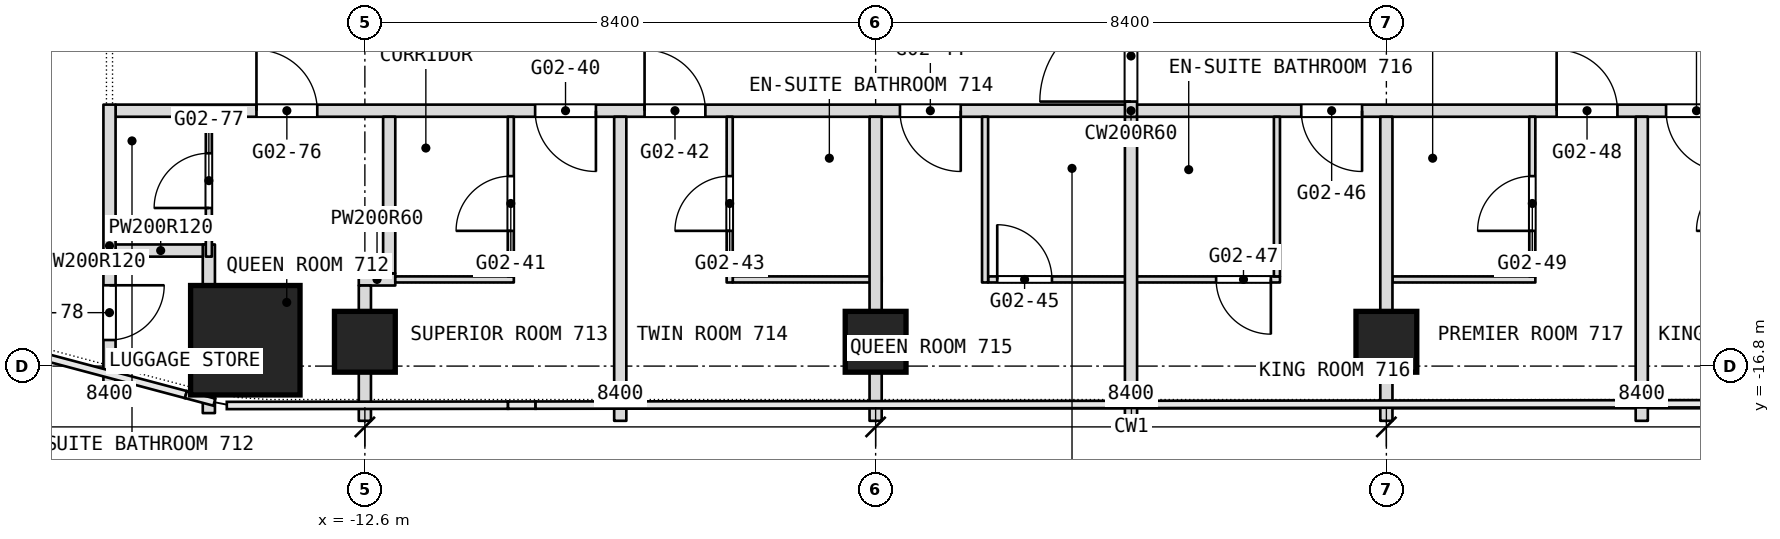
"""IFC4 building model, lengths in metres.
Left out: names, types, materials, properties, quantities, classifications, styles, units other than length and angle.
Written with IfcOpenShell. Run it as: python <this file> out.ifc"""

import sys

from ifc_helpers import new_model, si_unit, direction, frame, frame_2d, origin, origin_2d, place, context, subcontext, project, spatial, rectangle, extrude, element, fill, save


model = new_model("IFC4")
c1 = context("Model", 3, precision=1e-05, world=origin(), true_north=direction((0.0, 1.0)))
c2 = subcontext(c1, "Body", "Model", "MODEL_VIEW")
j1 = project(units=[si_unit("LENGTHUNIT", "METRE"), si_unit("PLANEANGLEUNIT", "RADIAN")], contexts=[c1])
p1 = place(None, origin())
s1 = spatial("IfcSite", under=j1, at=p1, CompositionType="ELEMENT")
p2 = place(p1, origin())
s2 = spatial("IfcBuilding", under=s1, at=p2, CompositionType="ELEMENT")
p3 = place(p2, frame((0.0, 0.0, 40.1)))
s3 = spatial("IfcBuildingStorey", under=s2, at=p3, CompositionType="ELEMENT", Elevation=40.1)
p4 = place(p3, frame((-14.566, -16.375, 0.0), z_axis=(0.0, 0.0, 1.0), x_axis=(1.0, 0.0, 0.0)))
e1 = element("IfcColumn", 1, at=p4, inside=s3, PredefinedType="COLUMN", context=c2, shape_type="SweptSolid", body=[
    extrude(rectangle(XDim=1.8, YDim=1.8, at=origin_2d()), origin(), (0.0, 0.0, 1.0), 3.6),
])
for number, where, z_axis, x_axis in (
    (2, (4.2, -16.4, 0.0), (0.0, 0.0, 1.0), (1.0, 0.0, 0.0)),
    (3, (-4.2, -16.4, 0.0), (0.0, 0.0, 1.0), (1.0, 0.0, 0.0)),
    (4, (-12.6, -16.4, 0.0), (0.0, 0.0, 1.0), (1.0, 0.0, 0.0)),
):
    element("IfcColumn", number, at=place(p3, frame(where, z_axis=z_axis, x_axis=x_axis)), inside=s3, PredefinedType="COLUMN", context=c2, shape_type="SweptSolid", body=[
        extrude(rectangle(XDim=1.0, YDim=1.0, at=origin_2d()), origin(), (0.0, 0.0, 1.0), 3.6),
    ])
p5 = place(p3, frame((-12.7, -15.375, 0.0), z_axis=(0.0, 0.0, 1.0), x_axis=(1.0, 0.0, 0.0)))
e5 = element("IfcWall", 5, at=p5, inside=s3, PredefinedType="PARTITIONING", context=c2, shape_type="SweptSolid", body=[
    extrude(rectangle(XDim=0.6, YDim=0.2, at=frame_2d((0.3, 0.0))), origin(), (0.0, 0.0, 1.0), 3.34),
])
p6 = place(p3, frame((-12.1, -15.375, 0.0), z_axis=(0.0, 0.0, 1.0), x_axis=(1.0, 0.0, 0.0)))
e6 = element("IfcWall", 6, at=p6, inside=s3, PredefinedType="PARTITIONING", context=c2, shape_type="SweptSolid", body=[
    extrude(rectangle(XDim=1.95, YDim=0.1, at=frame_2d((0.975, 0.0))), origin(), (0.0, 0.0, 1.0), 3.34),
])
p7 = place(p3, frame((-6.55, -15.375, 0.0), z_axis=(0.0, 0.0, 1.0), x_axis=(1.0, 0.0, 0.0)))
e7 = element("IfcWall", 7, at=p7, inside=s3, PredefinedType="PARTITIONING", context=c2, shape_type="SweptSolid", body=[
    extrude(rectangle(XDim=2.45, YDim=0.1, at=frame_2d((1.225, 0.0))), origin(), (0.0, 0.0, 1.0), 3.34),
])
p8 = place(p3, frame((-2.35, -15.375, 0.0), z_axis=(0.0, 0.0, 1.0), x_axis=(1.0, 0.0, 0.0)))
e8 = element("IfcWall", 8, at=p8, inside=s3, PredefinedType="PARTITIONING", context=c2, shape_type="SweptSolid", body=[
    extrude(rectangle(XDim=4.8, YDim=0.1, at=frame_2d((2.4, 0.0))), origin(), (0.0, 0.0, 1.0), 3.34),
])
p9 = place(p8, frame((0.15, 0.0, 0.0)))
e9 = element("IfcOpeningElement", 9, at=p9, cuts=e8, PredefinedType="OPENING", context=c2, shape_type="SweptSolid", body=[
    extrude(rectangle(XDim=0.9, YDim=2.1, at=frame_2d((0.45, 1.05))), frame((0.0, 0.05, 0.0), z_axis=(0.0, -1.0, 0.0), x_axis=(1.0, 0.0, 0.0)), (0.0, 0.0, 1.0), 0.1),
])
p10 = place(p8, frame((3.75, 0.0, 0.0)))
e10 = element("IfcOpeningElement", 10, at=p10, cuts=e8, PredefinedType="OPENING", context=c2, shape_type="SweptSolid", body=[
    extrude(rectangle(XDim=0.9, YDim=2.1, at=frame_2d((0.45, 1.05))), frame((0.0, 0.05, 0.0), z_axis=(0.0, -1.0, 0.0), x_axis=(1.0, 0.0, 0.0)), (0.0, 0.0, 1.0), 0.1),
])
p11 = place(p3, frame((4.3, -15.375, 0.0), z_axis=(0.0, 0.0, 1.0), x_axis=(1.0, 0.0, 0.0)))
e11 = element("IfcWall", 11, at=p11, inside=s3, PredefinedType="PARTITIONING", context=c2, shape_type="SweptSolid", body=[
    extrude(rectangle(XDim=2.35, YDim=0.1, at=frame_2d((1.175, 0.0))), origin(), (0.0, 0.0, 1.0), 3.34),
])
p12 = place(p3, frame((-16.7, -14.9, 0.0), z_axis=(0.0, 0.0, 1.0), x_axis=(1.0, 0.0, 0.0)))
e12 = element("IfcWall", 12, at=p12, inside=s3, PredefinedType="PARTITIONING", context=c2, shape_type="SweptSolid", body=[
    extrude(rectangle(XDim=1.484, YDim=0.2, at=frame_2d((0.742, 0.0))), origin(), (0.0, 0.0, 1.0), 3.34),
])
p13 = place(p3, frame((-16.7, -12.6, 0.0), z_axis=(0.0, 0.0, 1.0), x_axis=(1.0, 0.0, 0.0)))
e13 = element("IfcWall", 13, at=p13, inside=s3, PredefinedType="PARTITIONING", context=c2, shape_type="SweptSolid", body=[
    extrude(rectangle(XDim=33.4, YDim=0.2, at=frame_2d((16.7, 0.0))), origin(), (0.0, 0.0, 1.0), 3.34),
])
p14 = place(p13, frame((6.9, 0.0, 0.0)))
e14 = element("IfcOpeningElement", 14, at=p14, cuts=e13, PredefinedType="OPENING", context=c2, shape_type="SweptSolid", body=[
    extrude(rectangle(XDim=1.0, YDim=2.1, at=frame_2d((0.5, 1.05))), frame((0.0, 0.1, 0.0), z_axis=(0.0, -1.0, 0.0), x_axis=(1.0, 0.0, 0.0)), (0.0, 0.0, 1.0), 0.2),
])
p15 = place(p13, frame((8.7, 0.0, 0.0)))
e15 = element("IfcOpeningElement", 15, at=p15, cuts=e13, PredefinedType="OPENING", context=c2, shape_type="SweptSolid", body=[
    extrude(rectangle(XDim=1.0, YDim=2.1, at=frame_2d((0.5, 1.05))), frame((0.0, 0.1, 0.0), z_axis=(0.0, -1.0, 0.0), x_axis=(1.0, 0.0, 0.0)), (0.0, 0.0, 1.0), 0.2),
])
p16 = place(p13, frame((12.9, 0.0, 0.0)))
e16 = element("IfcOpeningElement", 16, at=p16, cuts=e13, PredefinedType="OPENING", context=c2, shape_type="SweptSolid", body=[
    extrude(rectangle(XDim=1.0, YDim=2.1, at=frame_2d((0.5, 1.05))), frame((0.0, 0.1, 0.0), z_axis=(0.0, -1.0, 0.0), x_axis=(1.0, 0.0, 0.0)), (0.0, 0.0, 1.0), 0.2),
])
p17 = place(p13, frame((19.5, 0.0, 0.0)))
e17 = element("IfcOpeningElement", 17, at=p17, cuts=e13, PredefinedType="OPENING", context=c2, shape_type="SweptSolid", body=[
    extrude(rectangle(XDim=1.0, YDim=2.1, at=frame_2d((0.5, 1.05))), frame((0.0, 0.1, 0.0), z_axis=(0.0, -1.0, 0.0), x_axis=(1.0, 0.0, 0.0)), (0.0, 0.0, 1.0), 0.2),
])
p18 = place(p13, frame((23.7, 0.0, 0.0)))
e18 = element("IfcOpeningElement", 18, at=p18, cuts=e13, PredefinedType="OPENING", context=c2, shape_type="SweptSolid", body=[
    extrude(rectangle(XDim=1.0, YDim=2.1, at=frame_2d((0.5, 1.05))), frame((0.0, 0.1, 0.0), z_axis=(0.0, -1.0, 0.0), x_axis=(1.0, 0.0, 0.0)), (0.0, 0.0, 1.0), 0.2),
])
p19 = place(p13, frame((25.5, 0.0, 0.0)))
e19 = element("IfcOpeningElement", 19, at=p19, cuts=e13, PredefinedType="OPENING", context=c2, shape_type="SweptSolid", body=[
    extrude(rectangle(XDim=1.0, YDim=2.1, at=frame_2d((0.5, 1.05))), frame((0.0, 0.1, 0.0), z_axis=(0.0, -1.0, 0.0), x_axis=(1.0, 0.0, 0.0)), (0.0, 0.0, 1.0), 0.2),
])
p20 = place(p13, frame((2.317, 0.0, 0.0)))
e20 = element("IfcOpeningElement", 20, at=p20, cuts=e13, PredefinedType="OPENING", context=c2, shape_type="SweptSolid", body=[
    extrude(rectangle(XDim=1.0, YDim=2.1, at=frame_2d((0.5, 1.05))), frame((0.0, 0.1, 0.0), z_axis=(0.0, -1.0, 0.0), x_axis=(1.0, 0.0, 0.0)), (0.0, 0.0, 1.0), 0.2),
])
p21 = place(p13, frame((30.083, 0.0, 0.0)))
e21 = element("IfcOpeningElement", 21, at=p21, cuts=e13, PredefinedType="OPENING", context=c2, shape_type="SweptSolid", body=[
    extrude(rectangle(XDim=1.0, YDim=2.1, at=frame_2d((0.5, 1.05))), frame((0.0, 0.1, 0.0), z_axis=(0.0, -1.0, 0.0), x_axis=(1.0, 0.0, 0.0)), (0.0, 0.0, 1.0), 0.2),
])
p22 = place(p3, frame((8.4, -17.7, 0.0), z_axis=(0.0, 0.0, 1.0), x_axis=(0.0, 1.0, 0.0)))
e22 = element("IfcWall", 22, at=p22, inside=s3, PredefinedType="PARTITIONING", context=c2, shape_type="SweptSolid", body=[
    extrude(rectangle(XDim=5.0, YDim=0.2, at=frame_2d((2.5, 0.0))), origin(), (0.0, 0.0, 1.0), 3.34),
])
p23 = place(p3, frame((6.6, -15.325, 0.0), z_axis=(0.0, 0.0, 1.0), x_axis=(0.0, 1.0, 0.0)))
e23 = element("IfcWall", 23, at=p23, inside=s3, PredefinedType="PARTITIONING", context=c2, shape_type="SweptSolid", body=[
    extrude(rectangle(XDim=2.625, YDim=0.1, at=frame_2d((1.312, 0.0))), origin(), (0.0, 0.0, 1.0), 3.34),
])
p24 = place(p23, frame((0.749, 0.0, 0.0)))
e24 = element("IfcOpeningElement", 24, at=p24, cuts=e23, PredefinedType="OPENING", context=c2, shape_type="SweptSolid", body=[
    extrude(rectangle(XDim=0.9, YDim=2.1, at=frame_2d((0.45, 1.05))), frame((0.0, 0.05, 0.0), z_axis=(0.0, -1.0, 0.0), x_axis=(1.0, 0.0, 0.0)), (0.0, 0.0, 1.0), 0.1),
])
p25 = place(p3, frame((4.2, -17.7, 0.0), z_axis=(0.0, 0.0, 1.0), x_axis=(0.0, 1.0, 0.0)))
e25 = element("IfcWall", 25, at=p25, inside=s3, PredefinedType="PARTITIONING", context=c2, shape_type="SweptSolid", body=[
    extrude(rectangle(XDim=5.0, YDim=0.2, at=frame_2d((2.5, 0.0))), origin(), (0.0, 0.0, 1.0), 3.34),
])
p26 = place(p3, frame((2.4, -15.325, 0.0), z_axis=(0.0, 0.0, 1.0), x_axis=(0.0, 1.0, 0.0)))
e26 = element("IfcWall", 26, at=p26, inside=s3, PredefinedType="PARTITIONING", context=c2, shape_type="SweptSolid", body=[
    extrude(rectangle(XDim=2.625, YDim=0.1, at=frame_2d((1.312, 0.0))), origin(), (0.0, 0.0, 1.0), 3.34),
])
p27 = place(p3, frame((0.0, -17.7, 0.0), z_axis=(0.0, 0.0, 1.0), x_axis=(0.0, 1.0, 0.0)))
e27 = element("IfcWall", 27, at=p27, inside=s3, PredefinedType="PARTITIONING", context=c2, shape_type="SweptSolid", body=[
    extrude(rectangle(XDim=5.0, YDim=0.2, at=frame_2d((2.5, 0.0))), origin(), (0.0, 0.0, 1.0), 3.34),
])
p28 = place(p3, frame((0.0, -12.7, 0.0), z_axis=(0.0, 0.0, 1.0), x_axis=(0.0, 1.0, 0.0)))
e28 = element("IfcWall", 28, at=p28, inside=s3, PredefinedType="PARTITIONING", context=c2, shape_type="SweptSolid", body=[
    extrude(rectangle(XDim=12.7, YDim=0.2, at=frame_2d((6.35, 0.0))), origin(), (0.0, 0.0, 1.0), 3.34),
])
p29 = place(p28, frame((11.05, 0.0, 0.0)))
e29 = element("IfcOpeningElement", 29, at=p29, cuts=e28, PredefinedType="OPENING", context=c2, shape_type="SweptSolid", body=[
    extrude(rectangle(XDim=1.5, YDim=2.1, at=frame_2d((0.75, 1.05))), frame((0.0, 0.1, 0.0), z_axis=(0.0, -1.0, 0.0), x_axis=(1.0, 0.0, 0.0)), (0.0, 0.0, 1.0), 0.2),
])
p30 = place(p28, frame((0.25, 0.0, 0.0)))
e30 = element("IfcOpeningElement", 30, at=p30, cuts=e28, PredefinedType="OPENING", context=c2, shape_type="SweptSolid", body=[
    extrude(rectangle(XDim=1.5, YDim=2.1, at=frame_2d((0.75, 1.05))), frame((0.0, 0.1, 0.0), z_axis=(0.0, -1.0, 0.0), x_axis=(1.0, 0.0, 0.0)), (0.0, 0.0, 1.0), 0.2),
])
p31 = place(p3, frame((-2.4, -15.425, 0.0), z_axis=(0.0, 0.0, 1.0), x_axis=(0.0, 1.0, 0.0)))
e31 = element("IfcWall", 31, at=p31, inside=s3, PredefinedType="PARTITIONING", context=c2, shape_type="SweptSolid", body=[
    extrude(rectangle(XDim=2.725, YDim=0.1, at=frame_2d((1.363, 0.0))), origin(), (0.0, 0.0, 1.0), 3.34),
])
p32 = place(p3, frame((-4.2, -17.7, 0.0), z_axis=(0.0, 0.0, 1.0), x_axis=(0.0, 1.0, 0.0)))
e32 = element("IfcWall", 32, at=p32, inside=s3, PredefinedType="PARTITIONING", context=c2, shape_type="SweptSolid", body=[
    extrude(rectangle(XDim=5.0, YDim=0.2, at=frame_2d((2.5, 0.0))), origin(), (0.0, 0.0, 1.0), 3.34),
])
p33 = place(p3, frame((-6.6, -15.425, 0.0), z_axis=(0.0, 0.0, 1.0), x_axis=(0.0, 1.0, 0.0)))
e33 = element("IfcWall", 33, at=p33, inside=s3, PredefinedType="PARTITIONING", context=c2, shape_type="SweptSolid", body=[
    extrude(rectangle(XDim=2.725, YDim=0.1, at=frame_2d((1.363, 0.0))), origin(), (0.0, 0.0, 1.0), 3.34),
])
p34 = place(p33, frame((0.849, 0.0, 0.0)))
e34 = element("IfcOpeningElement", 34, at=p34, cuts=e33, PredefinedType="OPENING", context=c2, shape_type="SweptSolid", body=[
    extrude(rectangle(XDim=0.9, YDim=2.1, at=frame_2d((0.45, 1.05))), frame((0.0, 0.05, 0.0), z_axis=(0.0, -1.0, 0.0), x_axis=(1.0, 0.0, 0.0)), (0.0, 0.0, 1.0), 0.1),
])
p35 = place(p3, frame((-8.4, -17.7, 0.0), z_axis=(0.0, 0.0, 1.0), x_axis=(0.0, 1.0, 0.0)))
e35 = element("IfcWall", 35, at=p35, inside=s3, PredefinedType="PARTITIONING", context=c2, shape_type="SweptSolid", body=[
    extrude(rectangle(XDim=5.0, YDim=0.2, at=frame_2d((2.5, 0.0))), origin(), (0.0, 0.0, 1.0), 3.34),
])
p36 = place(p3, frame((-10.2, -15.325, 0.0), z_axis=(0.0, 0.0, 1.0), x_axis=(0.0, 1.0, 0.0)))
e36 = element("IfcWall", 36, at=p36, inside=s3, PredefinedType="PARTITIONING", context=c2, shape_type="SweptSolid", body=[
    extrude(rectangle(XDim=2.625, YDim=0.1, at=frame_2d((1.312, 0.0))), origin(), (0.0, 0.0, 1.0), 3.34),
])
p37 = place(p36, frame((0.749, 0.0, 0.0)))
e37 = element("IfcOpeningElement", 37, at=p37, cuts=e36, PredefinedType="OPENING", context=c2, shape_type="SweptSolid", body=[
    extrude(rectangle(XDim=0.9, YDim=2.1, at=frame_2d((0.45, 1.05))), frame((0.0, 0.05, 0.0), z_axis=(0.0, -1.0, 0.0), x_axis=(1.0, 0.0, 0.0)), (0.0, 0.0, 1.0), 0.1),
])
p38 = place(p3, frame((-12.2, -15.275, 0.0), z_axis=(0.0, 0.0, 1.0), x_axis=(0.0, 1.0, 0.0)))
e38 = element("IfcWall", 38, at=p38, inside=s3, PredefinedType="PARTITIONING", context=c2, shape_type="SweptSolid", body=[
    extrude(rectangle(XDim=2.575, YDim=0.2, at=frame_2d((1.288, 0.0))), origin(), (0.0, 0.0, 1.0), 3.34),
])
p39 = place(p3, frame((-12.6, -17.7, 0.0), z_axis=(0.0, 0.0, 1.0), x_axis=(0.0, 1.0, 0.0)))
e39 = element("IfcWall", 39, at=p39, inside=s3, PredefinedType="PARTITIONING", context=c2, shape_type="SweptSolid", body=[
    extrude(rectangle(XDim=2.225, YDim=0.2, at=frame_2d((1.112, 0.0))), origin(), (0.0, 0.0, 1.0), 3.34),
])
p40 = place(p3, frame((-15.166, -17.573, 0.0), z_axis=(0.0, 0.0, 1.0), x_axis=(0.0, 1.0, 0.0)))
e40 = element("IfcWall", 40, at=p40, inside=s3, PredefinedType="PARTITIONING", context=c2, shape_type="SweptSolid", body=[
    extrude(rectangle(XDim=0.298, YDim=0.2, at=frame_2d((0.149, 0.0))), origin(), (0.0, 0.0, 1.0), 3.34),
])
p41 = place(p3, frame((-15.166, -15.475, 0.0), z_axis=(0.0, 0.0, 1.0), x_axis=(0.0, 1.0, 0.0)))
e41 = element("IfcWall", 41, at=p41, inside=s3, PredefinedType="PARTITIONING", context=c2, shape_type="SweptSolid", body=[
    extrude(rectangle(XDim=0.675, YDim=0.2, at=frame_2d((0.337, 0.0))), origin(), (0.0, 0.0, 1.0), 3.34),
])
p42 = place(p3, frame((-15.166, -15.0, 0.0), z_axis=(0.0, 0.0, 1.0), x_axis=(0.0, 1.0, 0.0)))
e42 = element("IfcWall", 42, at=p42, inside=s3, PredefinedType="PARTITIONING", context=c2, shape_type="SweptSolid", body=[
    extrude(rectangle(XDim=2.3, YDim=0.1, at=frame_2d((1.15, 0.0))), origin(), (0.0, 0.0, 1.0), 3.34),
])
p43 = place(p42, frame((0.8, 0.0, 0.0)))
e43 = element("IfcOpeningElement", 43, at=p43, cuts=e42, PredefinedType="OPENING", context=c2, shape_type="SweptSolid", body=[
    extrude(rectangle(XDim=0.9, YDim=2.1, at=frame_2d((0.45, 1.05))), frame((0.0, 0.05, 0.0), z_axis=(0.0, -1.0, 0.0), x_axis=(1.0, 0.0, 0.0)), (0.0, 0.0, 1.0), 0.1),
])
p44 = place(p3, frame((-16.8, -17.143, 0.0), z_axis=(0.0, 0.0, 1.0), x_axis=(0.0, 1.0, 0.0)))
e44 = element("IfcWall", 44, at=p44, inside=s3, PredefinedType="PARTITIONING", context=c2, shape_type="SweptSolid", body=[
    extrude(rectangle(XDim=4.643, YDim=0.2, at=frame_2d((2.322, 0.0))), origin(), (0.0, 0.0, 1.0), 3.34),
])
p45 = place(p44, frame((0.772, 0.0, 0.0)))
e45 = element("IfcOpeningElement", 45, at=p45, cuts=e44, PredefinedType="OPENING", context=c2, shape_type="SweptSolid", body=[
    extrude(rectangle(XDim=0.9, YDim=2.1, at=frame_2d((0.45, 1.05))), frame((0.0, 0.1, 0.0), z_axis=(0.0, -1.0, 0.0), x_axis=(1.0, 0.0, 0.0)), (0.0, 0.0, 1.0), 0.2),
])
p46 = place(p9, origin())
e46 = element("IfcDoor", 46, at=p46, inside=s3, OperationType="SINGLE_SWING_LEFT", PredefinedType="DOOR", context=c2, shape_type="SweptSolid", body=[
    extrude(rectangle(XDim=0.9, YDim=2.1, at=frame_2d((0.45, 1.05))), frame((0.0, 0.025, 0.0), z_axis=(0.0, -1.0, 0.0), x_axis=(1.0, 0.0, 0.0)), (0.0, 0.0, 1.0), 0.05),
])
fill(e9, e46)
p47 = place(p10, origin())
e47 = element("IfcDoor", 47, at=p47, inside=s3, OperationType="SINGLE_SWING_RIGHT", PredefinedType="DOOR", context=c2, shape_type="SweptSolid", body=[
    extrude(rectangle(XDim=0.9, YDim=2.1, at=frame_2d((0.45, 1.05))), frame((0.0, 0.025, 0.0), z_axis=(0.0, -1.0, 0.0), x_axis=(1.0, 0.0, 0.0)), (0.0, 0.0, 1.0), 0.05),
])
fill(e10, e47)
p48 = place(p14, origin())
e48 = element("IfcDoor", 48, at=p48, inside=s3, OperationType="SINGLE_SWING_RIGHT", PredefinedType="DOOR", context=c2, shape_type="SweptSolid", body=[
    extrude(rectangle(XDim=1.0, YDim=2.1, at=frame_2d((0.5, 1.05))), frame((0.0, 0.025, 0.0), z_axis=(0.0, -1.0, 0.0), x_axis=(1.0, 0.0, 0.0)), (0.0, 0.0, 1.0), 0.05),
])
fill(e14, e48)
p49 = place(p15, origin())
e49 = element("IfcDoor", 49, at=p49, inside=s3, OperationType="SINGLE_SWING_RIGHT", PredefinedType="DOOR", context=c2, shape_type="SweptSolid", body=[
    extrude(rectangle(XDim=1.0, YDim=2.1, at=frame_2d((0.5, 1.05))), frame((0.0, 0.025, 0.0), z_axis=(0.0, -1.0, 0.0), x_axis=(1.0, 0.0, 0.0)), (0.0, 0.0, 1.0), 0.05),
])
fill(e15, e49)
p50 = place(p16, origin())
e50 = element("IfcDoor", 50, at=p50, inside=s3, OperationType="SINGLE_SWING_RIGHT", PredefinedType="DOOR", context=c2, shape_type="SweptSolid", body=[
    extrude(rectangle(XDim=1.0, YDim=2.1, at=frame_2d((0.5, 1.05))), frame((0.0, 0.025, 0.0), z_axis=(0.0, -1.0, 0.0), x_axis=(1.0, 0.0, 0.0)), (0.0, 0.0, 1.0), 0.05),
])
fill(e16, e50)
p51 = place(p17, origin())
e51 = element("IfcDoor", 51, at=p51, inside=s3, OperationType="SINGLE_SWING_RIGHT", PredefinedType="DOOR", context=c2, shape_type="SweptSolid", body=[
    extrude(rectangle(XDim=1.0, YDim=2.1, at=frame_2d((0.5, 1.05))), frame((0.0, 0.025, 0.0), z_axis=(0.0, -1.0, 0.0), x_axis=(1.0, 0.0, 0.0)), (0.0, 0.0, 1.0), 0.05),
])
fill(e17, e51)
p52 = place(p18, origin())
e52 = element("IfcDoor", 52, at=p52, inside=s3, OperationType="SINGLE_SWING_RIGHT", PredefinedType="DOOR", context=c2, shape_type="SweptSolid", body=[
    extrude(rectangle(XDim=1.0, YDim=2.1, at=frame_2d((0.5, 1.05))), frame((0.0, 0.025, 0.0), z_axis=(0.0, -1.0, 0.0), x_axis=(1.0, 0.0, 0.0)), (0.0, 0.0, 1.0), 0.05),
])
fill(e18, e52)
p53 = place(p19, origin())
e53 = element("IfcDoor", 53, at=p53, inside=s3, OperationType="SINGLE_SWING_RIGHT", PredefinedType="DOOR", context=c2, shape_type="SweptSolid", body=[
    extrude(rectangle(XDim=1.0, YDim=2.1, at=frame_2d((0.5, 1.05))), frame((0.0, 0.025, 0.0), z_axis=(0.0, -1.0, 0.0), x_axis=(1.0, 0.0, 0.0)), (0.0, 0.0, 1.0), 0.05),
])
fill(e19, e53)
p54 = place(p20, origin())
e54 = element("IfcDoor", 54, at=p54, inside=s3, OperationType="SINGLE_SWING_RIGHT", PredefinedType="DOOR", context=c2, shape_type="SweptSolid", body=[
    extrude(rectangle(XDim=1.0, YDim=2.1, at=frame_2d((0.5, 1.05))), frame((0.0, 0.025, 0.0), z_axis=(0.0, -1.0, 0.0), x_axis=(1.0, 0.0, 0.0)), (0.0, 0.0, 1.0), 0.05),
])
fill(e20, e54)
p55 = place(p24, origin())
e55 = element("IfcDoor", 55, at=p55, inside=s3, OperationType="SINGLE_SWING_LEFT", PredefinedType="DOOR", context=c2, shape_type="SweptSolid", body=[
    extrude(rectangle(XDim=0.9, YDim=2.1, at=frame_2d((0.45, 1.05))), frame((0.0, 0.025, 0.0), z_axis=(0.0, -1.0, 0.0), x_axis=(1.0, 0.0, 0.0)), (0.0, 0.0, 1.0), 0.05),
])
fill(e24, e55)
p56 = place(p34, origin())
e56 = element("IfcDoor", 56, at=p56, inside=s3, OperationType="SINGLE_SWING_RIGHT", PredefinedType="DOOR", context=c2, shape_type="SweptSolid", body=[
    extrude(rectangle(XDim=0.9, YDim=2.1, at=frame_2d((0.45, 1.05))), frame((0.0, 0.025, 0.0), z_axis=(0.0, -1.0, 0.0), x_axis=(1.0, 0.0, 0.0)), (0.0, 0.0, 1.0), 0.05),
])
fill(e34, e56)
p57 = place(p37, origin())
e57 = element("IfcDoor", 57, at=p57, inside=s3, OperationType="SINGLE_SWING_LEFT", PredefinedType="DOOR", context=c2, shape_type="SweptSolid", body=[
    extrude(rectangle(XDim=0.9, YDim=2.1, at=frame_2d((0.45, 1.05))), frame((0.0, 0.025, 0.0), z_axis=(0.0, -1.0, 0.0), x_axis=(1.0, 0.0, 0.0)), (0.0, 0.0, 1.0), 0.05),
])
fill(e37, e57)
p58 = place(p43, origin())
e58 = element("IfcDoor", 58, at=p58, inside=s3, OperationType="SINGLE_SWING_RIGHT", PredefinedType="DOOR", context=c2, shape_type="SweptSolid", body=[
    extrude(rectangle(XDim=0.9, YDim=2.1, at=frame_2d((0.45, 1.05))), frame((0.0, 0.025, 0.0), z_axis=(0.0, -1.0, 0.0), x_axis=(1.0, 0.0, 0.0)), (0.0, 0.0, 1.0), 0.05),
])
fill(e43, e58)
p59 = place(p45, origin())
e59 = element("IfcDoor", 59, at=p59, inside=s3, OperationType="SINGLE_SWING_LEFT", PredefinedType="DOOR", context=c2, shape_type="SweptSolid", body=[
    extrude(rectangle(XDim=0.9, YDim=2.1, at=frame_2d((0.45, 1.05))), frame((0.0, 0.025, 0.0), z_axis=(0.0, -1.0, 0.0), x_axis=(1.0, 0.0, 0.0)), (0.0, 0.0, 1.0), 0.05),
])
fill(e45, e59)
p60 = place(p30, origin())
e60 = element("IfcDoor", 60, at=p60, inside=s3, OperationType="DOUBLE_DOOR_DOUBLE_SWING", PredefinedType="DOOR", context=c2, shape_type="SweptSolid", body=[
    extrude(rectangle(XDim=1.5, YDim=2.1, at=frame_2d((0.75, 1.05))), frame((0.0, 0.025, 0.0), z_axis=(0.0, -1.0, 0.0), x_axis=(1.0, 0.0, 0.0)), (0.0, 0.0, 1.0), 0.05),
])
fill(e30, e60)
save(model, sys.argv[1])
